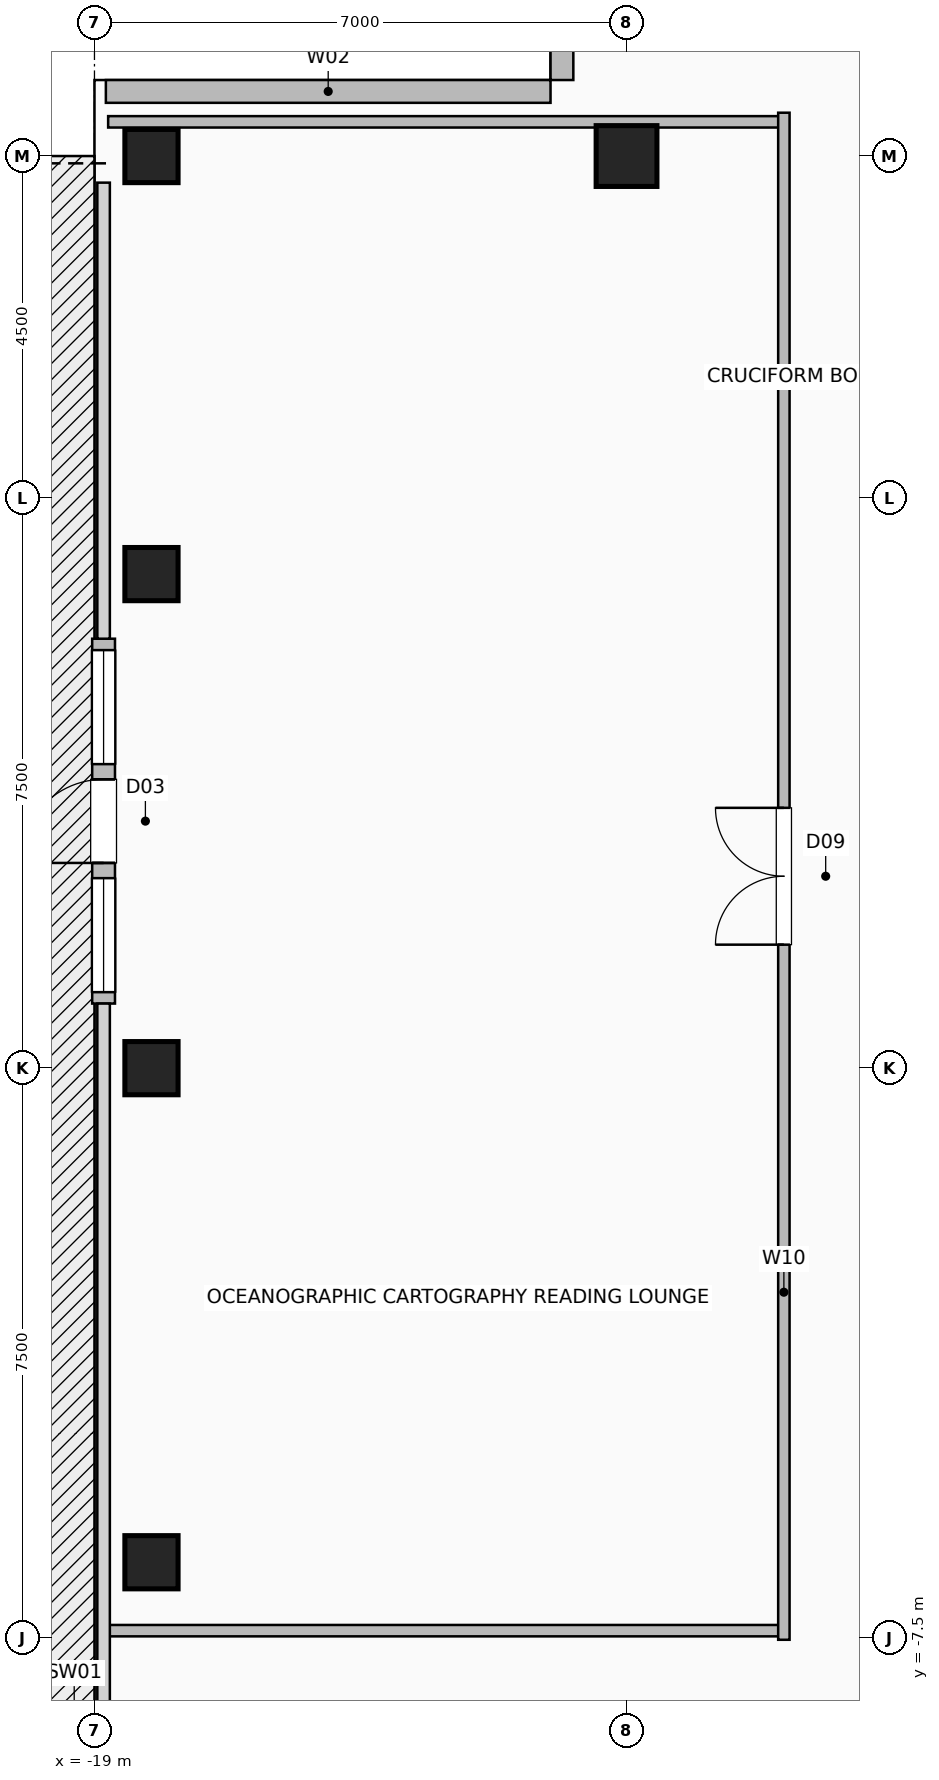
"""IFC4 building model, lengths in metres.
Left out: names, types, materials, properties, quantities, classifications, styles, units other than length and angle.
Written with IfcOpenShell. Run it as: python <this file> out.ifc"""

import sys

from ifc_helpers import new_model, si_unit, direction, frame, frame_2d, origin, origin_2d, place, context, subcontext, project, spatial, rectangle, hollow_rectangle, extrude, element, fill, save


model = new_model("IFC4")
c1 = context("Model", 3, precision=1e-05, world=origin(), true_north=direction((0.0, 1.0)))
c2 = subcontext(c1, "Body", "Model", "MODEL_VIEW")
j1 = project(units=[si_unit("LENGTHUNIT", "METRE"), si_unit("PLANEANGLEUNIT", "RADIAN")], contexts=[c1])
p1 = place(None, origin())
s1 = spatial("IfcSite", under=j1, at=p1, CompositionType="ELEMENT")
p2 = place(p1, origin())
s2 = spatial("IfcBuilding", under=s1, at=p2, CompositionType="ELEMENT")
p3 = place(p2, frame((0.0, 0.0, 264.8)))
s3 = spatial("IfcBuildingStorey", under=s2, at=p3, CompositionType="ELEMENT", Elevation=264.8)
for number, where, z_axis, x_axis in (
    (1, (-18.25, -6.5, 0.0), (0.0, 0.0, 1.0), (1.0, 0.0, 0.0)),
    (2, (-18.25, 0.0, 0.0), (0.0, 0.0, 1.0), (1.0, 0.0, 0.0)),
    (3, (-18.25, 6.5, 0.0), (0.0, 0.0, 1.0), (1.0, 0.0, 0.0)),
    (4, (-18.25, 12.0, 0.0), (0.0, 0.0, 1.0), (1.0, 0.0, 0.0)),
):
    element("IfcColumn", number, at=place(p3, frame(where, z_axis=z_axis, x_axis=x_axis)), inside=s3, PredefinedType="COLUMN", context=c2, shape_type="SweptSolid", body=[
        extrude(hollow_rectangle(XDim=0.7, YDim=0.7, WallThickness=0.035, at=origin_2d()), origin(), (0.0, 0.0, 1.0), 3.6),
    ])
p4 = place(p3, frame((-12.0, 12.0, 0.0), z_axis=(0.0, 0.0, 1.0), x_axis=(1.0, 0.0, 0.0)))
e5 = element("IfcColumn", 5, at=p4, inside=s3, PredefinedType="COLUMN", context=c2, shape_type="SweptSolid", body=[
    extrude(hollow_rectangle(XDim=0.8, YDim=0.8, WallThickness=0.04, at=origin_2d()), origin(), (0.0, 0.0, 1.0), 3.6),
])
p5 = place(p3, frame((-18.88, 0.85, 0.0), z_axis=(0.0, 0.0, 1.0), x_axis=(0.0, 1.0, 0.0)))
e6 = element("IfcWall", 6, at=p5, inside=s3, PredefinedType="SOLIDWALL", context=c2, shape_type="SweptSolid", body=[
    extrude(rectangle(XDim=4.8, YDim=0.3, at=frame_2d((2.4, 0.0))), origin(), (0.0, 0.0, 1.0), 3.36),
])
p6 = place(p5, frame((1.85, 0.0, 0.0)))
e7 = element("IfcOpeningElement", 7, at=p6, cuts=e6, PredefinedType="OPENING", context=c2, shape_type="SweptSolid", body=[
    extrude(rectangle(XDim=1.1, YDim=2.2, at=frame_2d((0.55, 1.1))), frame((0.0, 0.16, 0.0), z_axis=(0.0, -1.0, 0.0), x_axis=(1.0, 0.0, 0.0)), (0.0, 0.0, 1.0), 0.32),
])
p7 = place(p5, frame((0.15, 0.0, 0.85)))
e8 = element("IfcOpeningElement", 8, at=p7, cuts=e6, PredefinedType="OPENING", context=c2, shape_type="SweptSolid", body=[
    extrude(rectangle(XDim=1.5, YDim=1.8, at=frame_2d((0.75, 0.9))), frame((0.0, 0.16, 0.0), z_axis=(0.0, -1.0, 0.0), x_axis=(1.0, 0.0, 0.0)), (0.0, 0.0, 1.0), 0.32),
])
p8 = place(p5, frame((3.15, 0.0, 0.85)))
e9 = element("IfcOpeningElement", 9, at=p8, cuts=e6, PredefinedType="OPENING", context=c2, shape_type="SweptSolid", body=[
    extrude(rectangle(XDim=1.5, YDim=1.8, at=frame_2d((0.75, 0.9))), frame((0.0, 0.16, 0.0), z_axis=(0.0, -1.0, 0.0), x_axis=(1.0, 0.0, 0.0)), (0.0, 0.0, 1.0), 0.32),
])
p9 = place(p3, frame((-12.85, 18.85, 0.0), z_axis=(0.0, 0.0, 1.0), x_axis=(0.0, -1.0, 0.0)))
e10 = element("IfcWall", 10, at=p9, inside=s3, PredefinedType="SOLIDWALL", context=c2, shape_type="SweptSolid", body=[
    extrude(rectangle(XDim=5.85, YDim=0.3, at=frame_2d((2.925, 0.0))), origin(), (0.0, 0.0, 1.0), 3.36),
])
p10 = place(p9, frame((2.175, 0.0, 0.9)))
e11 = element("IfcOpeningElement", 11, at=p10, cuts=e10, PredefinedType="OPENING", context=c2, shape_type="SweptSolid", body=[
    extrude(rectangle(XDim=1.5, YDim=1.8, at=frame_2d((0.75, 0.9))), frame((0.0, 0.16, 0.0), z_axis=(0.0, -1.0, 0.0), x_axis=(1.0, 0.0, 0.0)), (0.0, 0.0, 1.0), 0.32),
])
p11 = place(p3, frame((-18.85, 12.85, 0.0), z_axis=(0.0, 0.0, 1.0), x_axis=(1.0, 0.0, 0.0)))
e12 = element("IfcWall", 12, at=p11, inside=s3, PredefinedType="SOLIDWALL", context=c2, shape_type="SweptSolid", body=[
    extrude(rectangle(XDim=5.85, YDim=0.3, at=frame_2d((2.925, 0.0))), origin(), (0.0, 0.0, 1.0), 3.36),
])
for number, where, z_axis, x_axis in (
    (13, (-18.82, -7.4, 0.0), (0.0, 0.0, 1.0), (1.0, 0.0, 0.0)),
    (14, (-18.82, 12.45, 0.0), (0.0, 0.0, 1.0), (1.0, 0.0, 0.0)),
):
    element("IfcWall", number, at=place(p3, frame(where, z_axis=z_axis, x_axis=x_axis)), inside=s3, PredefinedType="PARTITIONING", context=c2, shape_type="SweptSolid", body=[
        extrude(rectangle(XDim=8.89, YDim=0.15, at=frame_2d((4.445, 0.0))), origin(), (0.0, 0.0, 1.0), 3.36),
    ])
p12 = place(p3, frame((-9.93, -7.52, 0.0), z_axis=(0.0, 0.0, 1.0), x_axis=(0.0, 1.0, 0.0)))
e15 = element("IfcWall", 15, at=p12, inside=s3, PredefinedType="PARTITIONING", context=c2, shape_type="SweptSolid", body=[
    extrude(rectangle(XDim=20.09, YDim=0.15, at=frame_2d((10.045, 0.0))), origin(), (0.0, 0.0, 1.0), 3.36),
])
p13 = place(p12, frame((9.145, 0.0, 0.0)))
e16 = element("IfcOpeningElement", 16, at=p13, cuts=e15, PredefinedType="OPENING", context=c2, shape_type="SweptSolid", body=[
    extrude(rectangle(XDim=1.8, YDim=2.08, at=frame_2d((0.9, 1.04))), frame((0.0, 0.085, 0.0), z_axis=(0.0, -1.0, 0.0), x_axis=(1.0, 0.0, 0.0)), (0.0, 0.0, 1.0), 0.17),
])
p14 = place(p6, origin())
e17 = element("IfcDoor", 17, at=p14, inside=s3, OperationType="SINGLE_SWING_LEFT", PredefinedType="DOOR", context=c2, shape_type="SweptSolid", body=[
    extrude(rectangle(XDim=1.1, YDim=2.2, at=frame_2d((0.55, 1.1))), frame((0.0, 0.025, 0.0), z_axis=(0.0, -1.0, 0.0), x_axis=(1.0, 0.0, 0.0)), (0.0, 0.0, 1.0), 0.05),
])
fill(e7, e17)
p15 = place(p7, origin())
e18 = element("IfcWindow", 18, at=p15, inside=s3, PartitioningType="SINGLE_PANEL", PredefinedType="WINDOW", context=c2, shape_type="SweptSolid", body=[
    extrude(rectangle(XDim=1.5, YDim=1.8, at=frame_2d((0.75, 0.9))), frame((0.0, 0.03, 0.0), z_axis=(0.0, -1.0, 0.0), x_axis=(1.0, 0.0, 0.0)), (0.0, 0.0, 1.0), 0.06),
])
fill(e8, e18)
p16 = place(p8, origin())
e19 = element("IfcWindow", 19, at=p16, inside=s3, PartitioningType="SINGLE_PANEL", PredefinedType="WINDOW", context=c2, shape_type="SweptSolid", body=[
    extrude(rectangle(XDim=1.5, YDim=1.8, at=frame_2d((0.75, 0.9))), frame((0.0, 0.03, 0.0), z_axis=(0.0, -1.0, 0.0), x_axis=(1.0, 0.0, 0.0)), (0.0, 0.0, 1.0), 0.06),
])
fill(e9, e19)
p17 = place(p13, origin())
e20 = element("IfcDoor", 20, at=p17, inside=s3, OperationType="DOUBLE_DOOR_SINGLE_SWING", PredefinedType="DOOR", context=c2, shape_type="SweptSolid", body=[
    extrude(rectangle(XDim=1.8, YDim=2.08, at=frame_2d((0.9, 1.04))), frame((0.0, 0.025, 0.0), z_axis=(0.0, -1.0, 0.0), x_axis=(1.0, 0.0, 0.0)), (0.0, 0.0, 1.0), 0.05),
])
fill(e16, e20)
save(model, sys.argv[1])
